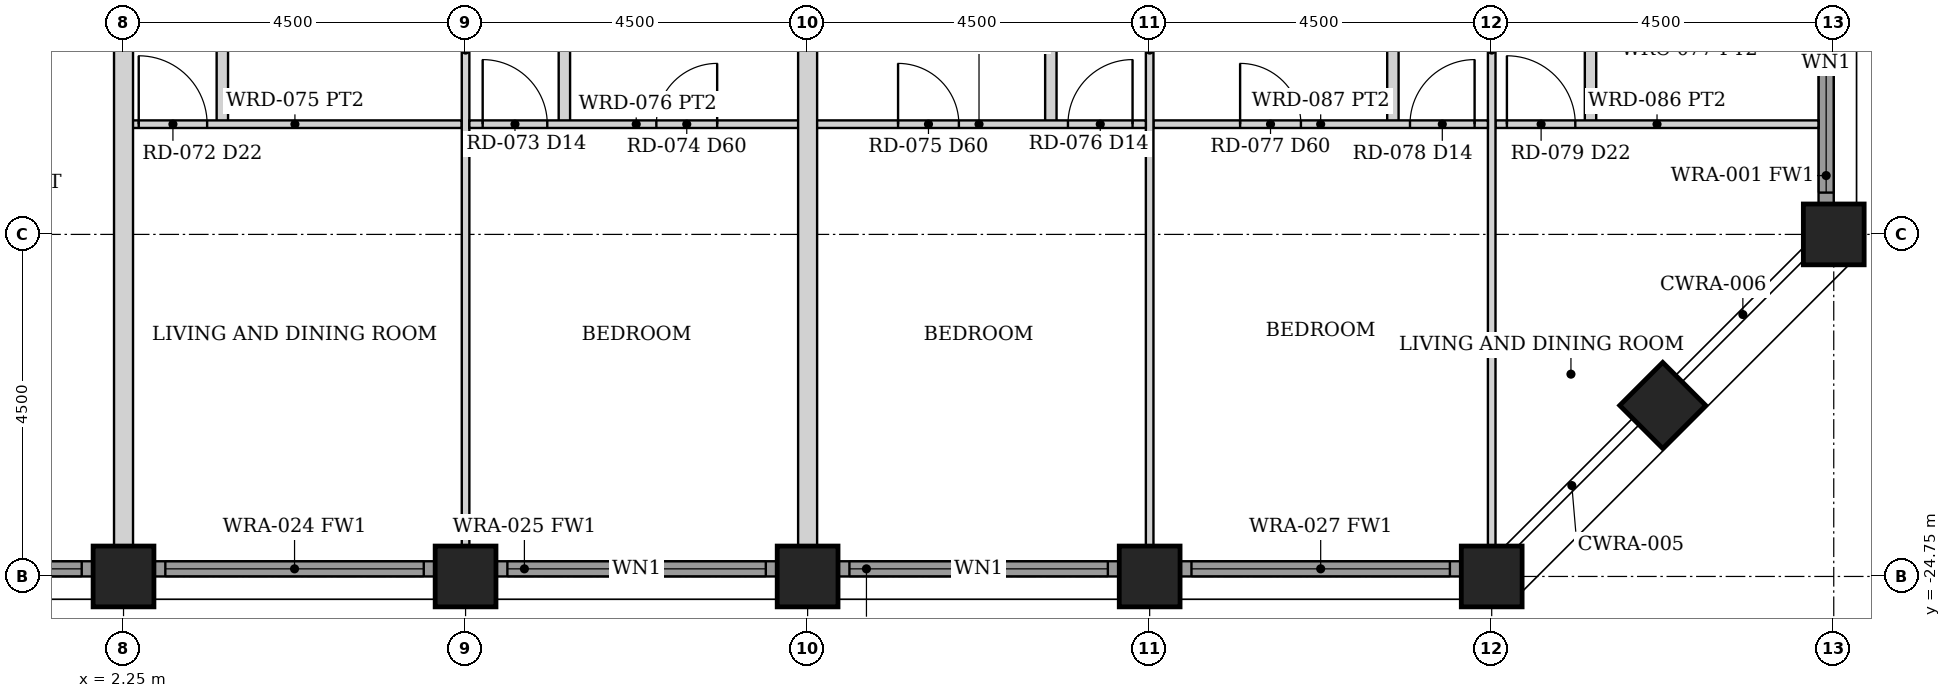
"""IFC4 building model, lengths in metres.
Left out: names, types, materials, properties, quantities, classifications, styles, units other than length and angle.
Written with IfcOpenShell. Run it as: python <this file> out.ifc"""

import sys

from ifc_helpers import new_model, si_unit, direction, frame, frame_2d, origin, origin_2d, place, context, subcontext, project, spatial, rectangle, hollow_rectangle, extrude, element, fill, save


model = new_model("IFC4")
c1 = context("Model", 3, precision=1e-05, world=origin(), true_north=direction((0.0, 1.0)))
c2 = subcontext(c1, "Body", "Model", "MODEL_VIEW")
j1 = project(units=[si_unit("LENGTHUNIT", "METRE"), si_unit("PLANEANGLEUNIT", "RADIAN")], contexts=[c1])
p1 = place(None, origin())
s1 = spatial("IfcSite", under=j1, at=p1, CompositionType="ELEMENT")
p2 = place(p1, origin())
s2 = spatial("IfcBuilding", under=s1, at=p2, CompositionType="ELEMENT")
p3 = place(p2, frame((0.0, 0.0, 58.0)))
s3 = spatial("IfcBuildingStorey", under=s2, at=p3, CompositionType="ELEMENT", Elevation=58.0)
for number, where, z_axis, x_axis in (
    (1, (24.75, -20.25, 0.0), (0.0, 0.0, 1.0), (1.0, 0.0, 0.0)),
    (2, (2.25, -24.75, 0.0), (0.0, 0.0, 1.0), (0.0, 1.0, 0.0)),
    (3, (6.75, -24.75, 0.0), (0.0, 0.0, 1.0), (0.0, 1.0, 0.0)),
    (4, (11.25, -24.75, 0.0), (0.0, 0.0, 1.0), (0.0, 1.0, 0.0)),
    (5, (15.75, -24.75, 0.0), (0.0, 0.0, 1.0), (0.0, 1.0, 0.0)),
    (6, (20.25, -24.75, 0.0), (0.0, 0.0, 1.0), (0.0, 1.0, 0.0)),
    (7, (22.5, -22.5, 0.0), (0.0, 0.0, 1.0), (0.707, -0.707, 0.0)),
):
    element("IfcColumn", number, at=place(p3, frame(where, z_axis=z_axis, x_axis=x_axis)), inside=s3, PredefinedType="COLUMN", context=c2, shape_type="SweptSolid", body=[
        extrude(hollow_rectangle(XDim=0.8, YDim=0.8, WallThickness=0.06, at=origin_2d()), origin(), (0.0, 0.0, 1.0), 3.5),
    ])
p4 = place(p3, frame((-1.845, -24.65, 0.0), z_axis=(0.0, 0.0, 1.0), x_axis=(1.0, 0.0, 0.0)))
e8 = element("IfcWall", 8, at=p4, inside=s3, PredefinedType="SOLIDWALL", context=c2, shape_type="SweptSolid", body=[
    extrude(rectangle(XDim=3.69, YDim=0.2, at=frame_2d((1.845, 0.0))), origin(), (0.0, 0.0, 1.0), 2.379),
])
p5 = place(p4, frame((0.145, 0.0, 0.3)))
e9 = element("IfcOpeningElement", 9, at=p5, cuts=e8, PredefinedType="OPENING", context=c2, shape_type="SweptSolid", body=[
    extrude(rectangle(XDim=3.4, YDim=1.929, at=frame_2d((1.7, 0.964))), frame((0.0, 0.11, 0.0), z_axis=(0.0, -1.0, 0.0), x_axis=(1.0, 0.0, 0.0)), (0.0, 0.0, 1.0), 0.22),
])
p6 = place(p3, frame((2.655, -24.65, 0.0), z_axis=(0.0, 0.0, 1.0), x_axis=(1.0, 0.0, 0.0)))
e10 = element("IfcWall", 10, at=p6, inside=s3, PredefinedType="SOLIDWALL", context=c2, shape_type="SweptSolid", body=[
    extrude(rectangle(XDim=3.69, YDim=0.2, at=frame_2d((1.845, 0.0))), origin(), (0.0, 0.0, 1.0), 2.379),
])
p7 = place(p6, frame((0.145, 0.0, 0.3)))
e11 = element("IfcOpeningElement", 11, at=p7, cuts=e10, PredefinedType="OPENING", context=c2, shape_type="SweptSolid", body=[
    extrude(rectangle(XDim=3.4, YDim=1.929, at=frame_2d((1.7, 0.964))), frame((0.0, 0.11, 0.0), z_axis=(0.0, -1.0, 0.0), x_axis=(1.0, 0.0, 0.0)), (0.0, 0.0, 1.0), 0.22),
])
p8 = place(p3, frame((7.155, -24.65, 0.0), z_axis=(0.0, 0.0, 1.0), x_axis=(1.0, 0.0, 0.0)))
e12 = element("IfcWall", 12, at=p8, inside=s3, PredefinedType="SOLIDWALL", context=c2, shape_type="SweptSolid", body=[
    extrude(rectangle(XDim=3.69, YDim=0.2, at=frame_2d((1.845, 0.0))), origin(), (0.0, 0.0, 1.0), 2.379),
])
p9 = place(p8, frame((0.145, 0.0, 0.3)))
e13 = element("IfcOpeningElement", 13, at=p9, cuts=e12, PredefinedType="OPENING", context=c2, shape_type="SweptSolid", body=[
    extrude(rectangle(XDim=3.4, YDim=1.929, at=frame_2d((1.7, 0.964))), frame((0.0, 0.11, 0.0), z_axis=(0.0, -1.0, 0.0), x_axis=(1.0, 0.0, 0.0)), (0.0, 0.0, 1.0), 0.22),
])
p10 = place(p3, frame((11.655, -24.65, 0.0), z_axis=(0.0, 0.0, 1.0), x_axis=(1.0, 0.0, 0.0)))
e14 = element("IfcWall", 14, at=p10, inside=s3, PredefinedType="SOLIDWALL", context=c2, shape_type="SweptSolid", body=[
    extrude(rectangle(XDim=3.69, YDim=0.2, at=frame_2d((1.845, 0.0))), origin(), (0.0, 0.0, 1.0), 2.379),
])
p11 = place(p10, frame((0.145, 0.0, 0.3)))
e15 = element("IfcOpeningElement", 15, at=p11, cuts=e14, PredefinedType="OPENING", context=c2, shape_type="SweptSolid", body=[
    extrude(rectangle(XDim=3.4, YDim=1.929, at=frame_2d((1.7, 0.964))), frame((0.0, 0.11, 0.0), z_axis=(0.0, -1.0, 0.0), x_axis=(1.0, 0.0, 0.0)), (0.0, 0.0, 1.0), 0.22),
])
p12 = place(p3, frame((16.155, -24.65, 0.0), z_axis=(0.0, 0.0, 1.0), x_axis=(1.0, 0.0, 0.0)))
e16 = element("IfcWall", 16, at=p12, inside=s3, PredefinedType="SOLIDWALL", context=c2, shape_type="SweptSolid", body=[
    extrude(rectangle(XDim=3.69, YDim=0.2, at=frame_2d((1.845, 0.0))), origin(), (0.0, 0.0, 1.0), 2.379),
])
p13 = place(p12, frame((0.145, 0.0, 0.3)))
e17 = element("IfcOpeningElement", 17, at=p13, cuts=e16, PredefinedType="OPENING", context=c2, shape_type="SweptSolid", body=[
    extrude(rectangle(XDim=3.4, YDim=1.929, at=frame_2d((1.7, 0.964))), frame((0.0, 0.11, 0.0), z_axis=(0.0, -1.0, 0.0), x_axis=(1.0, 0.0, 0.0)), (0.0, 0.0, 1.0), 0.22),
])
p14 = place(p3, frame((24.65, -19.845, 0.0), z_axis=(0.0, 0.0, 1.0), x_axis=(0.0, 1.0, 0.0)))
e18 = element("IfcWall", 18, at=p14, inside=s3, PredefinedType="SOLIDWALL", context=c2, shape_type="SweptSolid", body=[
    extrude(rectangle(XDim=3.69, YDim=0.2, at=frame_2d((1.845, 0.0))), origin(), (0.0, 0.0, 1.0), 2.379),
])
p15 = place(p14, frame((0.145, 0.0, 0.3)))
e19 = element("IfcOpeningElement", 19, at=p15, cuts=e18, PredefinedType="OPENING", context=c2, shape_type="SweptSolid", body=[
    extrude(rectangle(XDim=3.4, YDim=1.929, at=frame_2d((1.7, 0.964))), frame((0.0, 0.11, 0.0), z_axis=(0.0, -1.0, 0.0), x_axis=(1.0, 0.0, 0.0)), (0.0, 0.0, 1.0), 0.22),
])
p16 = place(p3, frame((3.55, -18.8, 0.0), z_axis=(0.0, 0.0, 1.0), x_axis=(0.0, 1.0, 0.0)))
e20 = element("IfcWall", 20, at=p16, inside=s3, PredefinedType="PARTITIONING", context=c2, shape_type="SweptSolid", body=[
    extrude(rectangle(XDim=7.5, YDim=0.15, at=frame_2d((3.75, 0.0))), origin(), (0.0, 0.0, 1.0), 2.373),
])
p17 = place(p16, frame((3.3, 0.0, 0.0)))
e21 = element("IfcOpeningElement", 21, at=p17, cuts=e20, PredefinedType="OPENING", context=c2, shape_type="SweptSolid", body=[
    extrude(rectangle(XDim=0.9, YDim=2.1, at=frame_2d((0.45, 1.05))), frame((0.0, 0.085, 0.0), z_axis=(0.0, -1.0, 0.0), x_axis=(1.0, 0.0, 0.0)), (0.0, 0.0, 1.0), 0.17),
])
p18 = place(p3, frame((2.31, -18.8, 0.0), z_axis=(0.0, 0.0, 1.0), x_axis=(1.0, 0.0, 0.0)))
e22 = element("IfcWall", 22, at=p18, inside=s3, PredefinedType="PARTITIONING", context=c2, shape_type="SweptSolid", body=[
    extrude(rectangle(XDim=4.39, YDim=0.1, at=frame_2d((2.195, 0.0))), origin(), (0.0, 0.0, 1.0), 2.373),
])
p19 = place(p18, frame((0.14, 0.0, 0.0)))
e23 = element("IfcOpeningElement", 23, at=p19, cuts=e22, PredefinedType="OPENING", context=c2, shape_type="SweptSolid", body=[
    extrude(rectangle(XDim=0.9, YDim=2.1, at=frame_2d((0.45, 1.05))), frame((0.0, 0.06, 0.0), z_axis=(0.0, -1.0, 0.0), x_axis=(1.0, 0.0, 0.0)), (0.0, 0.0, 1.0), 0.12),
])
p20 = place(p3, frame((6.75, -24.35, 0.0), z_axis=(0.0, 0.0, 1.0), x_axis=(0.0, 1.0, 0.0)))
e24 = element("IfcWall", 24, at=p20, inside=s3, PredefinedType="PARTITIONING", context=c2, shape_type="SweptSolid", body=[
    extrude(rectangle(XDim=13.05, YDim=0.1, at=frame_2d((6.525, 0.0))), origin(), (0.0, 0.0, 1.0), 2.373),
])
p21 = place(p3, frame((8.05, -18.8, 0.0), z_axis=(0.0, 0.0, 1.0), x_axis=(0.0, 1.0, 0.0)))
e25 = element("IfcWall", 25, at=p21, inside=s3, PredefinedType="PARTITIONING", context=c2, shape_type="SweptSolid", body=[
    extrude(rectangle(XDim=7.5, YDim=0.15, at=frame_2d((3.75, 0.0))), origin(), (0.0, 0.0, 1.0), 2.373),
])
p22 = place(p21, frame((5.75, 0.0, 0.0)))
e26 = element("IfcOpeningElement", 26, at=p22, cuts=e25, PredefinedType="OPENING", context=c2, shape_type="SweptSolid", body=[
    extrude(rectangle(XDim=0.9, YDim=2.1, at=frame_2d((0.45, 1.05))), frame((0.0, 0.085, 0.0), z_axis=(0.0, -1.0, 0.0), x_axis=(1.0, 0.0, 0.0)), (0.0, 0.0, 1.0), 0.17),
])
p23 = place(p3, frame((6.8, -18.8, 0.0), z_axis=(0.0, 0.0, 1.0), x_axis=(1.0, 0.0, 0.0)))
e27 = element("IfcWall", 27, at=p23, inside=s3, PredefinedType="PARTITIONING", context=c2, shape_type="SweptSolid", body=[
    extrude(rectangle(XDim=4.39, YDim=0.1, at=frame_2d((2.195, 0.0))), origin(), (0.0, 0.0, 1.0), 2.373),
])
p24 = place(p23, frame((0.175, 0.0, 0.0)))
e28 = element("IfcOpeningElement", 28, at=p24, cuts=e27, PredefinedType="OPENING", context=c2, shape_type="SweptSolid", body=[
    extrude(rectangle(XDim=0.85, YDim=2.1, at=frame_2d((0.425, 1.05))), frame((0.0, 0.06, 0.0), z_axis=(0.0, -1.0, 0.0), x_axis=(1.0, 0.0, 0.0)), (0.0, 0.0, 1.0), 0.12),
])
p25 = place(p23, frame((2.46, 0.0, 0.0)))
e29 = element("IfcOpeningElement", 29, at=p25, cuts=e27, PredefinedType="OPENING", context=c2, shape_type="SweptSolid", body=[
    extrude(rectangle(XDim=0.8, YDim=2.1, at=frame_2d((0.4, 1.05))), frame((0.0, 0.06, 0.0), z_axis=(0.0, -1.0, 0.0), x_axis=(1.0, 0.0, 0.0)), (0.0, 0.0, 1.0), 0.12),
])
p26 = place(p3, frame((21.55, -18.8, 0.0), z_axis=(0.0, 0.0, 1.0), x_axis=(0.0, 1.0, 0.0)))
e30 = element("IfcWall", 30, at=p26, inside=s3, PredefinedType="PARTITIONING", context=c2, shape_type="SweptSolid", body=[
    extrude(rectangle(XDim=7.5, YDim=0.15, at=frame_2d((3.75, 0.0))), origin(), (0.0, 0.0, 1.0), 2.373),
])
p27 = place(p26, frame((3.3, 0.0, 0.0)))
e31 = element("IfcOpeningElement", 31, at=p27, cuts=e30, PredefinedType="OPENING", context=c2, shape_type="SweptSolid", body=[
    extrude(rectangle(XDim=0.9, YDim=2.1, at=frame_2d((0.45, 1.05))), frame((0.0, 0.085, 0.0), z_axis=(0.0, -1.0, 0.0), x_axis=(1.0, 0.0, 0.0)), (0.0, 0.0, 1.0), 0.17),
])
p28 = place(p3, frame((20.3, -18.8, 0.0), z_axis=(0.0, 0.0, 1.0), x_axis=(1.0, 0.0, 0.0)))
e32 = element("IfcWall", 32, at=p28, inside=s3, PredefinedType="PARTITIONING", context=c2, shape_type="SweptSolid", body=[
    extrude(rectangle(XDim=4.25, YDim=0.1, at=frame_2d((2.125, 0.0))), origin(), (0.0, 0.0, 1.0), 2.373),
])
p29 = place(p28, frame((0.15, 0.0, 0.0)))
e33 = element("IfcOpeningElement", 33, at=p29, cuts=e32, PredefinedType="OPENING", context=c2, shape_type="SweptSolid", body=[
    extrude(rectangle(XDim=0.9, YDim=2.1, at=frame_2d((0.45, 1.05))), frame((0.0, 0.06, 0.0), z_axis=(0.0, -1.0, 0.0), x_axis=(1.0, 0.0, 0.0)), (0.0, 0.0, 1.0), 0.12),
])
p30 = place(p3, frame((20.25, -24.35, 0.0), z_axis=(0.0, 0.0, 1.0), x_axis=(0.0, 1.0, 0.0)))
e34 = element("IfcWall", 34, at=p30, inside=s3, PredefinedType="PARTITIONING", context=c2, shape_type="SweptSolid", body=[
    extrude(rectangle(XDim=13.05, YDim=0.1, at=frame_2d((6.525, 0.0))), origin(), (0.0, 0.0, 1.0), 2.373),
])
p31 = place(p3, frame((18.95, -18.8, 0.0), z_axis=(0.0, 0.0, 1.0), x_axis=(0.0, 1.0, 0.0)))
e35 = element("IfcWall", 35, at=p31, inside=s3, PredefinedType="PARTITIONING", context=c2, shape_type="SweptSolid", body=[
    extrude(rectangle(XDim=7.5, YDim=0.15, at=frame_2d((3.75, 0.0))), origin(), (0.0, 0.0, 1.0), 2.373),
])
p32 = place(p31, frame((5.75, 0.0, 0.0)))
e36 = element("IfcOpeningElement", 36, at=p32, cuts=e35, PredefinedType="OPENING", context=c2, shape_type="SweptSolid", body=[
    extrude(rectangle(XDim=0.9, YDim=2.1, at=frame_2d((0.45, 1.05))), frame((0.0, 0.085, 0.0), z_axis=(0.0, -1.0, 0.0), x_axis=(1.0, 0.0, 0.0)), (0.0, 0.0, 1.0), 0.17),
])
p33 = place(p3, frame((15.8, -18.8, 0.0), z_axis=(0.0, 0.0, 1.0), x_axis=(1.0, 0.0, 0.0)))
e37 = element("IfcWall", 37, at=p33, inside=s3, PredefinedType="PARTITIONING", context=c2, shape_type="SweptSolid", body=[
    extrude(rectangle(XDim=4.4, YDim=0.1, at=frame_2d((2.2, 0.0))), origin(), (0.0, 0.0, 1.0), 2.373),
])
p34 = place(p33, frame((3.375, 0.0, 0.0)))
e38 = element("IfcOpeningElement", 38, at=p34, cuts=e37, PredefinedType="OPENING", context=c2, shape_type="SweptSolid", body=[
    extrude(rectangle(XDim=0.85, YDim=2.1, at=frame_2d((0.425, 1.05))), frame((0.0, 0.06, 0.0), z_axis=(0.0, -1.0, 0.0), x_axis=(1.0, 0.0, 0.0)), (0.0, 0.0, 1.0), 0.12),
])
p35 = place(p33, frame((1.14, 0.0, 0.0)))
e39 = element("IfcOpeningElement", 39, at=p35, cuts=e37, PredefinedType="OPENING", context=c2, shape_type="SweptSolid", body=[
    extrude(rectangle(XDim=0.8, YDim=2.1, at=frame_2d((0.4, 1.05))), frame((0.0, 0.06, 0.0), z_axis=(0.0, -1.0, 0.0), x_axis=(1.0, 0.0, 0.0)), (0.0, 0.0, 1.0), 0.12),
])
p36 = place(p3, frame((15.75, -24.35, 0.0), z_axis=(0.0, 0.0, 1.0), x_axis=(0.0, 1.0, 0.0)))
e40 = element("IfcWall", 40, at=p36, inside=s3, PredefinedType="PARTITIONING", context=c2, shape_type="SweptSolid", body=[
    extrude(rectangle(XDim=13.05, YDim=0.1, at=frame_2d((6.525, 0.0))), origin(), (0.0, 0.0, 1.0), 2.373),
])
p37 = place(p3, frame((14.45, -18.8, 0.0), z_axis=(0.0, 0.0, 1.0), x_axis=(0.0, 1.0, 0.0)))
e41 = element("IfcWall", 41, at=p37, inside=s3, PredefinedType="PARTITIONING", context=c2, shape_type="SweptSolid", body=[
    extrude(rectangle(XDim=7.5, YDim=0.15, at=frame_2d((3.75, 0.0))), origin(), (0.0, 0.0, 1.0), 2.373),
])
p38 = place(p37, frame((5.75, 0.0, 0.0)))
e42 = element("IfcOpeningElement", 42, at=p38, cuts=e41, PredefinedType="OPENING", context=c2, shape_type="SweptSolid", body=[
    extrude(rectangle(XDim=0.9, YDim=2.1, at=frame_2d((0.45, 1.05))), frame((0.0, 0.085, 0.0), z_axis=(0.0, -1.0, 0.0), x_axis=(1.0, 0.0, 0.0)), (0.0, 0.0, 1.0), 0.17),
])
p39 = place(p3, frame((11.31, -18.8, 0.0), z_axis=(0.0, 0.0, 1.0), x_axis=(1.0, 0.0, 0.0)))
e43 = element("IfcWall", 43, at=p39, inside=s3, PredefinedType="PARTITIONING", context=c2, shape_type="SweptSolid", body=[
    extrude(rectangle(XDim=4.39, YDim=0.1, at=frame_2d((2.195, 0.0))), origin(), (0.0, 0.0, 1.0), 2.373),
])
p40 = place(p39, frame((3.365, 0.0, 0.0)))
e44 = element("IfcOpeningElement", 44, at=p40, cuts=e43, PredefinedType="OPENING", context=c2, shape_type="SweptSolid", body=[
    extrude(rectangle(XDim=0.85, YDim=2.1, at=frame_2d((0.425, 1.05))), frame((0.0, 0.06, 0.0), z_axis=(0.0, -1.0, 0.0), x_axis=(1.0, 0.0, 0.0)), (0.0, 0.0, 1.0), 0.12),
])
p41 = place(p39, frame((1.13, 0.0, 0.0)))
e45 = element("IfcOpeningElement", 45, at=p41, cuts=e43, PredefinedType="OPENING", context=c2, shape_type="SweptSolid", body=[
    extrude(rectangle(XDim=0.8, YDim=2.1, at=frame_2d((0.4, 1.05))), frame((0.0, 0.06, 0.0), z_axis=(0.0, -1.0, 0.0), x_axis=(1.0, 0.0, 0.0)), (0.0, 0.0, 1.0), 0.12),
])
for number, where, z_axis, x_axis in (
    (46, (2.25, -24.35, 0.0), (0.0, 0.0, 1.0), (0.0, 1.0, 0.0)),
    (47, (11.25, -24.35, 0.0), (0.0, 0.0, 1.0), (0.0, 1.0, 0.0)),
):
    element("IfcWall", number, at=place(p3, frame(where, z_axis=z_axis, x_axis=x_axis)), inside=s3, PredefinedType="PARTITIONING", context=c2, shape_type="SweptSolid", body=[
        extrude(rectangle(XDim=15.15, YDim=0.25, at=frame_2d((7.575, 0.0))), origin(), (0.0, 0.0, 1.0), 2.373),
    ])
p42 = place(p5, origin())
e48 = element("IfcWindow", 48, at=p42, inside=s3, PartitioningType="SINGLE_PANEL", PredefinedType="WINDOW", context=c2, shape_type="SweptSolid", body=[
    extrude(rectangle(XDim=3.4, YDim=1.929, at=frame_2d((1.7, 0.964))), frame((0.0, 0.03, 0.0), z_axis=(0.0, -1.0, 0.0), x_axis=(1.0, 0.0, 0.0)), (0.0, 0.0, 1.0), 0.06),
])
fill(e9, e48)
p43 = place(p7, origin())
e49 = element("IfcWindow", 49, at=p43, inside=s3, PartitioningType="SINGLE_PANEL", PredefinedType="WINDOW", context=c2, shape_type="SweptSolid", body=[
    extrude(rectangle(XDim=3.4, YDim=1.929, at=frame_2d((1.7, 0.964))), frame((0.0, 0.03, 0.0), z_axis=(0.0, -1.0, 0.0), x_axis=(1.0, 0.0, 0.0)), (0.0, 0.0, 1.0), 0.06),
])
fill(e11, e49)
p44 = place(p9, origin())
e50 = element("IfcWindow", 50, at=p44, inside=s3, PartitioningType="SINGLE_PANEL", PredefinedType="WINDOW", context=c2, shape_type="SweptSolid", body=[
    extrude(rectangle(XDim=3.4, YDim=1.929, at=frame_2d((1.7, 0.964))), frame((0.0, 0.03, 0.0), z_axis=(0.0, -1.0, 0.0), x_axis=(1.0, 0.0, 0.0)), (0.0, 0.0, 1.0), 0.06),
])
fill(e13, e50)
p45 = place(p11, origin())
e51 = element("IfcWindow", 51, at=p45, inside=s3, PartitioningType="SINGLE_PANEL", PredefinedType="WINDOW", context=c2, shape_type="SweptSolid", body=[
    extrude(rectangle(XDim=3.4, YDim=1.929, at=frame_2d((1.7, 0.964))), frame((0.0, 0.03, 0.0), z_axis=(0.0, -1.0, 0.0), x_axis=(1.0, 0.0, 0.0)), (0.0, 0.0, 1.0), 0.06),
])
fill(e15, e51)
p46 = place(p13, origin())
e52 = element("IfcWindow", 52, at=p46, inside=s3, PartitioningType="SINGLE_PANEL", PredefinedType="WINDOW", context=c2, shape_type="SweptSolid", body=[
    extrude(rectangle(XDim=3.4, YDim=1.929, at=frame_2d((1.7, 0.964))), frame((0.0, 0.03, 0.0), z_axis=(0.0, -1.0, 0.0), x_axis=(1.0, 0.0, 0.0)), (0.0, 0.0, 1.0), 0.06),
])
fill(e17, e52)
p47 = place(p15, origin())
e53 = element("IfcWindow", 53, at=p47, inside=s3, PartitioningType="SINGLE_PANEL", PredefinedType="WINDOW", context=c2, shape_type="SweptSolid", body=[
    extrude(rectangle(XDim=3.4, YDim=1.929, at=frame_2d((1.7, 0.964))), frame((0.0, 0.03, 0.0), z_axis=(0.0, -1.0, 0.0), x_axis=(1.0, 0.0, 0.0)), (0.0, 0.0, 1.0), 0.06),
])
fill(e19, e53)
p48 = place(p19, origin())
e54 = element("IfcDoor", 54, at=p48, inside=s3, OperationType="SINGLE_SWING_LEFT", PredefinedType="DOOR", context=c2, shape_type="SweptSolid", body=[
    extrude(rectangle(XDim=0.9, YDim=2.1, at=frame_2d((0.45, 1.05))), frame((0.0, 0.025, 0.0), z_axis=(0.0, -1.0, 0.0), x_axis=(1.0, 0.0, 0.0)), (0.0, 0.0, 1.0), 0.05),
])
fill(e23, e54)
p49 = place(p24, origin())
e55 = element("IfcDoor", 55, at=p49, inside=s3, OperationType="SINGLE_SWING_LEFT", PredefinedType="DOOR", context=c2, shape_type="SweptSolid", body=[
    extrude(rectangle(XDim=0.85, YDim=2.1, at=frame_2d((0.425, 1.05))), frame((0.0, 0.025, 0.0), z_axis=(0.0, -1.0, 0.0), x_axis=(1.0, 0.0, 0.0)), (0.0, 0.0, 1.0), 0.05),
])
fill(e28, e55)
p50 = place(p25, origin())
e56 = element("IfcDoor", 56, at=p50, inside=s3, OperationType="SINGLE_SWING_RIGHT", PredefinedType="DOOR", context=c2, shape_type="SweptSolid", body=[
    extrude(rectangle(XDim=0.8, YDim=2.1, at=frame_2d((0.4, 1.05))), frame((0.0, 0.025, 0.0), z_axis=(0.0, -1.0, 0.0), x_axis=(1.0, 0.0, 0.0)), (0.0, 0.0, 1.0), 0.05),
])
fill(e29, e56)
p51 = place(p29, origin())
e57 = element("IfcDoor", 57, at=p51, inside=s3, OperationType="SINGLE_SWING_LEFT", PredefinedType="DOOR", context=c2, shape_type="SweptSolid", body=[
    extrude(rectangle(XDim=0.9, YDim=2.1, at=frame_2d((0.45, 1.05))), frame((0.0, 0.025, 0.0), z_axis=(0.0, -1.0, 0.0), x_axis=(1.0, 0.0, 0.0)), (0.0, 0.0, 1.0), 0.05),
])
fill(e33, e57)
p52 = place(p34, origin())
e58 = element("IfcDoor", 58, at=p52, inside=s3, OperationType="SINGLE_SWING_RIGHT", PredefinedType="DOOR", context=c2, shape_type="SweptSolid", body=[
    extrude(rectangle(XDim=0.85, YDim=2.1, at=frame_2d((0.425, 1.05))), frame((0.0, 0.025, 0.0), z_axis=(0.0, -1.0, 0.0), x_axis=(1.0, 0.0, 0.0)), (0.0, 0.0, 1.0), 0.05),
])
fill(e38, e58)
p53 = place(p35, origin())
e59 = element("IfcDoor", 59, at=p53, inside=s3, OperationType="SINGLE_SWING_LEFT", PredefinedType="DOOR", context=c2, shape_type="SweptSolid", body=[
    extrude(rectangle(XDim=0.8, YDim=2.1, at=frame_2d((0.4, 1.05))), frame((0.0, 0.025, 0.0), z_axis=(0.0, -1.0, 0.0), x_axis=(1.0, 0.0, 0.0)), (0.0, 0.0, 1.0), 0.05),
])
fill(e39, e59)
p54 = place(p40, origin())
e60 = element("IfcDoor", 60, at=p54, inside=s3, OperationType="SINGLE_SWING_RIGHT", PredefinedType="DOOR", context=c2, shape_type="SweptSolid", body=[
    extrude(rectangle(XDim=0.85, YDim=2.1, at=frame_2d((0.425, 1.05))), frame((0.0, 0.025, 0.0), z_axis=(0.0, -1.0, 0.0), x_axis=(1.0, 0.0, 0.0)), (0.0, 0.0, 1.0), 0.05),
])
fill(e44, e60)
p55 = place(p41, origin())
e61 = element("IfcDoor", 61, at=p55, inside=s3, OperationType="SINGLE_SWING_LEFT", PredefinedType="DOOR", context=c2, shape_type="SweptSolid", body=[
    extrude(rectangle(XDim=0.8, YDim=2.1, at=frame_2d((0.4, 1.05))), frame((0.0, 0.025, 0.0), z_axis=(0.0, -1.0, 0.0), x_axis=(1.0, 0.0, 0.0)), (0.0, 0.0, 1.0), 0.05),
])
fill(e45, e61)
save(model, sys.argv[1])
